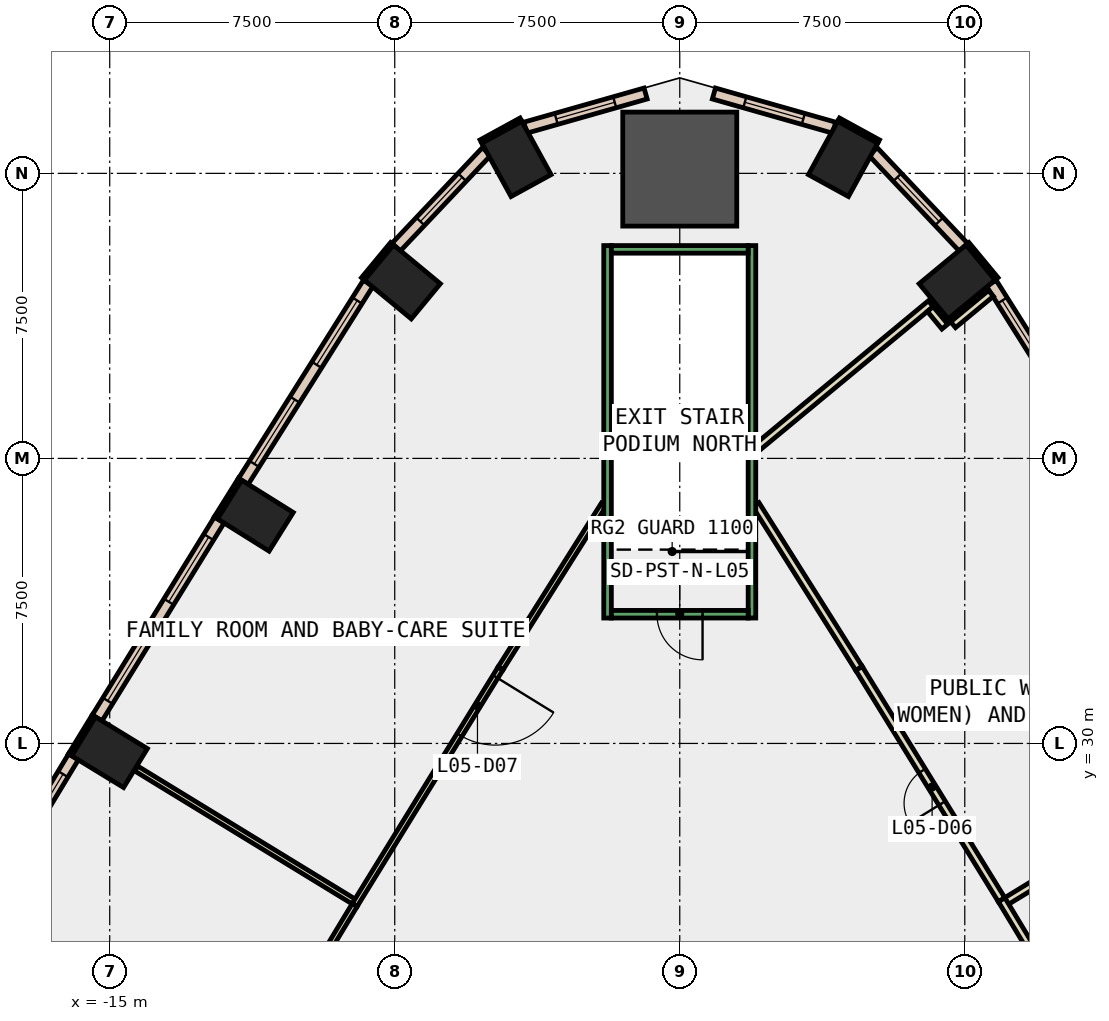
"""IFC4 building model, lengths in metres.
Left out: names, types, materials, properties, quantities, classifications, styles, units other than length and angle.
Written with IfcOpenShell. Run it as: python <this file> out.ifc"""

import sys

from ifc_helpers import new_model, si_unit, direction, frame, frame_2d, origin, origin_2d, place, context, subcontext, project, spatial, rectangle, extrude, element, fill, save


model = new_model("IFC4")
c1 = context("Model", 3, precision=1e-05, world=origin(), true_north=direction((0.0, 1.0)))
c2 = subcontext(c1, "Body", "Model", "MODEL_VIEW")
j1 = project(units=[si_unit("LENGTHUNIT", "METRE"), si_unit("PLANEANGLEUNIT", "RADIAN")], contexts=[c1])
p1 = place(None, origin())
s1 = spatial("IfcSite", under=j1, at=p1, CompositionType="ELEMENT")
p2 = place(p1, origin())
s2 = spatial("IfcBuilding", under=s1, at=p2, CompositionType="ELEMENT")
p3 = place(p2, frame((0.0, 0.0, 30.0)))
s3 = spatial("IfcBuildingStorey", under=s2, at=p3, CompositionType="ELEMENT", Elevation=30.0)
for number, where, z_axis, x_axis in (
    (1, (7.299, 42.144, -0.45), (0.0, 0.0, 1.0), (-0.638, 0.77, 0.0)),
    (2, (4.297, 45.38, -0.45), (0.0, 0.0, 1.0), (-0.877, 0.48, 0.0)),
):
    element("IfcColumn", number, at=place(p3, frame(where, z_axis=z_axis, x_axis=x_axis)), inside=s3, PredefinedType="COLUMN", context=c2, shape_type="SweptSolid", body=[
        extrude(rectangle(XDim=1.2, YDim=1.6, at=origin_2d()), origin(), (0.0, 0.0, 1.0), 4.85),
    ])
p4 = place(p3, frame((0.0, 45.112, -0.45), z_axis=(0.0, 0.0, 1.0), x_axis=(0.0, 1.0, 0.0)))
e3 = element("IfcColumn", 3, at=p4, inside=s3, PredefinedType="COLUMN", context=c2, shape_type="SweptSolid", body=[
    extrude(rectangle(XDim=3.0, YDim=3.0, at=origin_2d()), origin(), (0.0, 0.0, 1.0), 4.85),
])
for number, where, z_axis, x_axis in (
    (4, (-4.297, 45.38, -0.45), (0.0, 0.0, 1.0), (0.877, 0.48, 0.0)),
    (5, (-7.299, 42.144, -0.45), (0.0, 0.0, 1.0), (0.638, 0.77, 0.0)),
    (6, (-11.167, 35.993, -0.45), (0.0, 0.0, 1.0), (0.53, 0.848, 0.0)),
    (7, (-15.005, 29.769, -0.45), (0.0, 0.0, 1.0), (0.522, 0.853, 0.0)),
):
    element("IfcColumn", number, at=place(p3, frame(where, z_axis=z_axis, x_axis=x_axis)), inside=s3, PredefinedType="COLUMN", context=c2, shape_type="SweptSolid", body=[
        extrude(rectangle(XDim=1.2, YDim=1.6, at=origin_2d()), origin(), (0.0, 0.0, 1.0), 4.85),
    ])
for number, where, z_axis, x_axis in (
    (8, (5.231, 45.837, 0.0), (0.0, 0.0, 1.0), (-0.877, 0.48, 0.0)),
    (9, (-4.179, 46.413, 0.0), (0.0, 0.0, 1.0), (-0.877, -0.48, 0.0)),
    (10, (8.336, 42.224, 0.0), (0.0, 0.0, 1.0), (-0.638, 0.77, 0.0)),
    (11, (-7.571, 43.148, 0.0), (0.0, 0.0, 1.0), (-0.638, -0.77, 0.0)),
    (12, (-11.57, 36.952, 0.0), (0.0, 0.0, 1.0), (-0.53, -0.848, 0.0)),
):
    element("IfcWall", number, at=place(p3, frame(where, z_axis=z_axis, x_axis=x_axis)), inside=s3, PredefinedType="STANDARD", context=c2, shape_type="SweptSolid", body=[
        extrude(rectangle(XDim=1.199, YDim=0.1, at=frame_2d((0.6, 0.0))), origin(), (0.0, 0.0, 1.0), 4.4),
    ])
p5 = place(p3, frame((-15.417, 30.724, 0.0), z_axis=(0.0, 0.0, 1.0), x_axis=(-0.521507599072, -0.853246637327, 0.0)))
e13 = element("IfcWall", 13, at=p5, inside=s3, PredefinedType="STANDARD", context=c2, shape_type="SweptSolid", body=[
    extrude(rectangle(XDim=1.2, YDim=0.1, at=frame_2d((0.6, 0.0))), origin(), (0.0, 0.0, 1.0), 4.4),
])
p6 = place(p3, frame((11.483, 36.897, 0.0), z_axis=(0.0, 0.0, 1.0), x_axis=(-0.53304020879, 0.846089910006, 0.0)))
e14 = element("IfcWall", 14, at=p6, inside=s3, PredefinedType="STANDARD", context=c2, shape_type="SweptSolid", body=[
    extrude(rectangle(XDim=6.163, YDim=0.3, at=frame_2d((3.081, 0.0))), origin(), (0.0, 0.0, 1.0), 4.4),
])
p7 = place(p6, frame((0.541, 0.0, 1.0)))
e15 = element("IfcOpeningElement", 15, at=p7, cuts=e14, PredefinedType="OPENING", context=c2, shape_type="SweptSolid", body=[
    extrude(rectangle(XDim=2.0, YDim=3.2, at=frame_2d((1.0, 1.6))), frame((0.0, 0.16, 0.0), z_axis=(0.0, -1.0, 0.0), x_axis=(1.0, 0.0, 0.0)), (0.0, 0.0, 1.0), 0.32),
])
p8 = place(p6, frame((3.622, 0.0, 1.0)))
e16 = element("IfcOpeningElement", 16, at=p8, cuts=e14, PredefinedType="OPENING", context=c2, shape_type="SweptSolid", body=[
    extrude(rectangle(XDim=2.0, YDim=3.2, at=frame_2d((1.0, 1.6))), frame((0.0, 0.16, 0.0), z_axis=(0.0, -1.0, 0.0), x_axis=(1.0, 0.0, 0.0)), (0.0, 0.0, 1.0), 0.32),
])
p9 = place(p3, frame((7.464, 43.058, 0.0), z_axis=(0.0, 0.0, 1.0), x_axis=(-0.687081126245, 0.726580708495, 0.0)))
e17 = element("IfcWall", 17, at=p9, inside=s3, PredefinedType="STANDARD", context=c2, shape_type="SweptSolid", body=[
    extrude(rectangle(XDim=3.461, YDim=0.3, at=frame_2d((1.73, 0.0))), origin(), (0.0, 0.0, 1.0), 4.4),
])
p10 = place(p9, frame((0.931, 0.0, 1.0)))
e18 = element("IfcOpeningElement", 18, at=p10, cuts=e17, PredefinedType="OPENING", context=c2, shape_type="SweptSolid", body=[
    extrude(rectangle(XDim=1.6, YDim=3.2, at=frame_2d((0.8, 1.6))), frame((0.0, 0.16, 0.0), z_axis=(0.0, -1.0, 0.0), x_axis=(1.0, 0.0, 0.0)), (0.0, 0.0, 1.0), 0.32),
])
p11 = place(p3, frame((4.064, 46.202, 0.0), z_axis=(0.0, 0.0, 1.0), x_axis=(-0.961934470867, 0.273280211062, 0.0)))
e19 = element("IfcWall", 19, at=p11, inside=s3, PredefinedType="STANDARD", context=c2, shape_type="SweptSolid", body=[
    extrude(rectangle(XDim=3.29, YDim=0.3, at=frame_2d((1.645, 0.0))), origin(), (0.0, 0.0, 1.0), 4.4),
])
p12 = place(p11, frame((0.845, 0.0, 1.0)))
e20 = element("IfcOpeningElement", 20, at=p12, cuts=e19, PredefinedType="OPENING", context=c2, shape_type="SweptSolid", body=[
    extrude(rectangle(XDim=1.6, YDim=3.2, at=frame_2d((0.8, 1.6))), frame((0.0, 0.16, 0.0), z_axis=(0.0, -1.0, 0.0), x_axis=(1.0, 0.0, 0.0)), (0.0, 0.0, 1.0), 0.32),
])
p13 = place(p3, frame((-0.899, 47.101, 0.0), z_axis=(0.0, 0.0, 1.0), x_axis=(-0.961934470867, -0.273280211062, 0.0)))
e21 = element("IfcWall", 21, at=p13, inside=s3, PredefinedType="STANDARD", context=c2, shape_type="SweptSolid", body=[
    extrude(rectangle(XDim=3.29, YDim=0.3, at=frame_2d((1.645, 0.0))), origin(), (0.0, 0.0, 1.0), 4.4),
])
p14 = place(p13, frame((0.845, 0.0, 1.0)))
e22 = element("IfcOpeningElement", 22, at=p14, cuts=e21, PredefinedType="OPENING", context=c2, shape_type="SweptSolid", body=[
    extrude(rectangle(XDim=1.6, YDim=3.2, at=frame_2d((0.8, 1.6))), frame((0.0, 0.16, 0.0), z_axis=(0.0, -1.0, 0.0), x_axis=(1.0, 0.0, 0.0)), (0.0, 0.0, 1.0), 0.32),
])
p15 = place(p3, frame((-5.086, 45.573, 0.0), z_axis=(0.0, 0.0, 1.0), x_axis=(-0.687081126245, -0.726580708495, 0.0)))
e23 = element("IfcWall", 23, at=p15, inside=s3, PredefinedType="STANDARD", context=c2, shape_type="SweptSolid", body=[
    extrude(rectangle(XDim=3.461, YDim=0.3, at=frame_2d((1.73, 0.0))), origin(), (0.0, 0.0, 1.0), 4.4),
])
p16 = place(p15, frame((0.931, 0.0, 1.0)))
e24 = element("IfcOpeningElement", 24, at=p16, cuts=e23, PredefinedType="OPENING", context=c2, shape_type="SweptSolid", body=[
    extrude(rectangle(XDim=1.6, YDim=3.2, at=frame_2d((0.8, 1.6))), frame((0.0, 0.16, 0.0), z_axis=(0.0, -1.0, 0.0), x_axis=(1.0, 0.0, 0.0)), (0.0, 0.0, 1.0), 0.32),
])
p17 = place(p3, frame((-8.198, 42.111, 0.0), z_axis=(0.0, 0.0, 1.0), x_axis=(-0.53304020879, -0.846089910006, 0.0)))
e25 = element("IfcWall", 25, at=p17, inside=s3, PredefinedType="STANDARD", context=c2, shape_type="SweptSolid", body=[
    extrude(rectangle(XDim=6.163, YDim=0.3, at=frame_2d((3.081, 0.0))), origin(), (0.0, 0.0, 1.0), 4.4),
])
p18 = place(p17, frame((0.541, 0.0, 1.0)))
e26 = element("IfcOpeningElement", 26, at=p18, cuts=e25, PredefinedType="OPENING", context=c2, shape_type="SweptSolid", body=[
    extrude(rectangle(XDim=2.0, YDim=3.2, at=frame_2d((1.0, 1.6))), frame((0.0, 0.16, 0.0), z_axis=(0.0, -1.0, 0.0), x_axis=(1.0, 0.0, 0.0)), (0.0, 0.0, 1.0), 0.32),
])
p19 = place(p17, frame((3.622, 0.0, 1.0)))
e27 = element("IfcOpeningElement", 27, at=p19, cuts=e25, PredefinedType="OPENING", context=c2, shape_type="SweptSolid", body=[
    extrude(rectangle(XDim=2.0, YDim=3.2, at=frame_2d((1.0, 1.6))), frame((0.0, 0.16, 0.0), z_axis=(0.0, -1.0, 0.0), x_axis=(1.0, 0.0, 0.0)), (0.0, 0.0, 1.0), 0.32),
])
p20 = place(p3, frame((-12.117, 35.881, 0.0), z_axis=(0.0, 0.0, 1.0), x_axis=(-0.524953701886, -0.85113078365, 0.0)))
e28 = element("IfcWall", 28, at=p20, inside=s3, PredefinedType="STANDARD", context=c2, shape_type="SweptSolid", body=[
    extrude(rectangle(XDim=6.123, YDim=0.3, at=frame_2d((3.061, 0.0))), origin(), (0.0, 0.0, 1.0), 4.4),
])
p21 = place(p20, frame((0.531, 0.0, 1.0)))
e29 = element("IfcOpeningElement", 29, at=p21, cuts=e28, PredefinedType="OPENING", context=c2, shape_type="SweptSolid", body=[
    extrude(rectangle(XDim=2.0, YDim=3.2, at=frame_2d((1.0, 1.6))), frame((0.0, 0.16, 0.0), z_axis=(0.0, -1.0, 0.0), x_axis=(1.0, 0.0, 0.0)), (0.0, 0.0, 1.0), 0.32),
])
p22 = place(p20, frame((3.592, 0.0, 1.0)))
e30 = element("IfcOpeningElement", 30, at=p22, cuts=e28, PredefinedType="OPENING", context=c2, shape_type="SweptSolid", body=[
    extrude(rectangle(XDim=2.0, YDim=3.2, at=frame_2d((1.0, 1.6))), frame((0.0, 0.16, 0.0), z_axis=(0.0, -1.0, 0.0), x_axis=(1.0, 0.0, 0.0)), (0.0, 0.0, 1.0), 0.32),
])
p23 = place(p3, frame((-15.954, 29.647, 0.0), z_axis=(0.0, 0.0, 1.0), x_axis=(-0.516687651362, -0.85617397235, 0.0)))
e31 = element("IfcWall", 31, at=p23, inside=s3, PredefinedType="STANDARD", context=c2, shape_type="SweptSolid", body=[
    extrude(rectangle(XDim=6.121, YDim=0.3, at=frame_2d((3.061, 0.0))), origin(), (0.0, 0.0, 1.0), 4.4),
])
p24 = place(p23, frame((0.53, 0.0, 1.0)))
e32 = element("IfcOpeningElement", 32, at=p24, cuts=e31, PredefinedType="OPENING", context=c2, shape_type="SweptSolid", body=[
    extrude(rectangle(XDim=2.0, YDim=3.2, at=frame_2d((1.0, 1.6))), frame((0.0, 0.16, 0.0), z_axis=(0.0, -1.0, 0.0), x_axis=(1.0, 0.0, 0.0)), (0.0, 0.0, 1.0), 0.32),
])
p25 = place(p23, frame((3.591, 0.0, 1.0)))
e33 = element("IfcOpeningElement", 33, at=p25, cuts=e31, PredefinedType="OPENING", context=c2, shape_type="SweptSolid", body=[
    extrude(rectangle(XDim=2.0, YDim=3.2, at=frame_2d((1.0, 1.6))), frame((0.0, 0.16, 0.0), z_axis=(0.0, -1.0, 0.0), x_axis=(1.0, 0.0, 0.0)), (0.0, 0.0, 1.0), 0.32),
])
p26 = place(p3, frame((8.52, 25.804, 0.0), z_axis=(0.0, 0.0, 1.0), x_axis=(0.853194970622, 0.521592122358, 0.0)))
e34 = element("IfcWall", 34, at=p26, inside=s3, PredefinedType="PARTITIONING", context=c2, shape_type="SweptSolid", body=[
    extrude(rectangle(XDim=6.601, YDim=0.2, at=frame_2d((3.301, 0.0))), origin(), (0.0, 0.0, 1.0), 4.4),
])
p27 = place(p3, frame((12.256, 19.614, 0.0), z_axis=(0.0, 0.0, 1.0), x_axis=(-0.516756729015, 0.856132281261, 0.0)))
e35 = element("IfcWall", 35, at=p27, inside=s3, PredefinedType="PARTITIONING", context=c2, shape_type="SweptSolid", body=[
    extrude(rectangle(XDim=7.331, YDim=0.2, at=frame_2d((3.665, 0.0))), origin(), (0.0, 0.0, 1.0), 4.4),
])
p28 = place(p27, frame((0.1, 0.0, 0.0)))
e36 = element("IfcOpeningElement", 36, at=p28, cuts=e35, PredefinedType="OPENING", context=c2, shape_type="SweptSolid", body=[
    extrude(rectangle(XDim=1.0, YDim=2.1, at=frame_2d((0.5, 1.05))), frame((0.0, 0.11, 0.0), z_axis=(0.0, -1.0, 0.0), x_axis=(1.0, 0.0, 0.0)), (0.0, 0.0, 1.0), 0.22),
])
p29 = place(p3, frame((2.0, 37.758, 0.0), z_axis=(0.0, 0.0, 1.0), x_axis=(0.7702988792, 0.637683022122, 0.0)))
e37 = element("IfcWall", 37, at=p29, inside=s3, PredefinedType="PARTITIONING", context=c2, shape_type="SweptSolid", body=[
    extrude(rectangle(XDim=5.979, YDim=0.2, at=frame_2d((2.99, 0.0))), origin(), (0.0, 0.0, 1.0), 4.4),
])
p30 = place(p3, frame((6.593, 41.43, 0.0), z_axis=(0.0, 0.0, 1.0), x_axis=(0.636576557089, -0.771213515808, 0.0)))
e38 = element("IfcWall", 38, at=p30, inside=s3, PredefinedType="PARTITIONING", context=c2, shape_type="SweptSolid", body=[
    extrude(rectangle(XDim=0.6, YDim=0.2, at=frame_2d((0.3, 0.0))), origin(), (0.0, 0.0, 1.0), 4.4),
])
p31 = place(p3, frame((7.193, 41.018, 0.0), z_axis=(0.0, 0.0, 1.0), x_axis=(0.77046149962, 0.637486531311, 0.0)))
e39 = element("IfcWall", 39, at=p31, inside=s3, PredefinedType="PARTITIONING", context=c2, shape_type="SweptSolid", body=[
    extrude(rectangle(XDim=1.292, YDim=0.2, at=frame_2d((0.646, 0.0))), origin(), (0.0, 0.0, 1.0), 4.4),
])
p32 = place(p3, frame((4.717, 31.973, 0.0), z_axis=(0.0, 0.0, 1.0), x_axis=(-0.533277069601, 0.845940640375, 0.0)))
e40 = element("IfcWall", 40, at=p32, inside=s3, PredefinedType="PARTITIONING", context=c2, shape_type="SweptSolid", body=[
    extrude(rectangle(XDim=5.095, YDim=0.2, at=frame_2d((2.547, 0.0))), origin(), (0.0, 0.0, 1.0), 4.4),
])
p33 = place(p3, frame((8.467, 25.89, 0.0), z_axis=(0.0, 0.0, 1.0), x_axis=(-0.524768238136, 0.851245144623, 0.0)))
e41 = element("IfcWall", 41, at=p33, inside=s3, PredefinedType="PARTITIONING", context=c2, shape_type="SweptSolid", body=[
    extrude(rectangle(XDim=7.146, YDim=0.2, at=frame_2d((3.573, 0.0))), origin(), (0.0, 0.0, 1.0), 4.4),
])
p34 = place(p33, frame((2.981, 0.0, 0.0)))
e42 = element("IfcOpeningElement", 42, at=p34, cuts=e41, PredefinedType="OPENING", context=c2, shape_type="SweptSolid", body=[
    extrude(rectangle(XDim=1.0, YDim=2.1, at=frame_2d((0.5, 1.05))), frame((0.0, 0.11, 0.0), z_axis=(0.0, -1.0, 0.0), x_axis=(1.0, 0.0, 0.0)), (0.0, 0.0, 1.0), 0.22),
])
p35 = place(p3, frame((-8.52, 25.804, 0.0), z_axis=(0.0, 0.0, 1.0), x_axis=(-0.85315809523, 0.521652436535, 0.0)))
e43 = element("IfcWall", 43, at=p35, inside=s3, PredefinedType="PARTITIONING", context=c2, shape_type="SweptSolid", body=[
    extrude(rectangle(XDim=6.781, YDim=0.15, at=frame_2d((3.39, 0.0))), origin(), (0.0, 0.0, 1.0), 4.4),
])
p36 = place(p3, frame((-2.0, 36.283, 0.0), z_axis=(0.0, 0.0, 1.0), x_axis=(-0.533277069601, -0.845940640375, 0.0)))
e44 = element("IfcWall", 44, at=p36, inside=s3, PredefinedType="PARTITIONING", context=c2, shape_type="SweptSolid", body=[
    extrude(rectangle(XDim=5.095, YDim=0.15, at=frame_2d((2.547, 0.0))), origin(), (0.0, 0.0, 1.0), 4.4),
])
p37 = place(p3, frame((-4.717, 31.973, 0.0), z_axis=(0.0, 0.0, 1.0), x_axis=(-0.524752860455, -0.85125462433, 0.0)))
e45 = element("IfcWall", 45, at=p37, inside=s3, PredefinedType="PARTITIONING", context=c2, shape_type="SweptSolid", body=[
    extrude(rectangle(XDim=7.314, YDim=0.15, at=frame_2d((3.657, 0.0))), origin(), (0.0, 0.0, 1.0), 4.4),
])
p38 = place(p37, frame((0.255, 0.0, 0.0)))
e46 = element("IfcOpeningElement", 46, at=p38, cuts=e45, PredefinedType="OPENING", context=c2, shape_type="SweptSolid", body=[
    extrude(rectangle(XDim=1.8, YDim=2.1, at=frame_2d((0.9, 1.05))), frame((0.0, 0.085, 0.0), z_axis=(0.0, -1.0, 0.0), x_axis=(1.0, 0.0, 0.0)), (0.0, 0.0, 1.0), 0.17),
])
p39 = place(p3, frame((-8.554, 25.747, 0.0), z_axis=(0.0, 0.0, 1.0), x_axis=(-0.516784275168, -0.85611565395, 0.0)))
e47 = element("IfcWall", 47, at=p39, inside=s3, PredefinedType="PARTITIONING", context=c2, shape_type="SweptSolid", body=[
    extrude(rectangle(XDim=7.164, YDim=0.15, at=frame_2d((3.582, 0.0))), origin(), (0.0, 0.0, 1.0), 4.4),
])
for number, where, z_axis, x_axis in (
    (48, (1.9, 33.3, 0.0), (0.0, 0.0, 1.0), (0.0, 1.0, 0.0)),
    (49, (-1.9, 33.3, 0.0), (0.0, 0.0, 1.0), (0.0, 1.0, 0.0)),
):
    element("IfcWall", number, at=place(p3, frame(where, z_axis=z_axis, x_axis=x_axis)), inside=s3, PredefinedType="STANDARD", context=c2, shape_type="SweptSolid", body=[
        extrude(rectangle(XDim=9.8, YDim=0.2, at=frame_2d((4.9, 0.0))), origin(), (0.0, 0.0, 1.0), 3.2),
    ])
p40 = place(p3, frame((1.8, 33.4, 0.0), z_axis=(0.0, 0.0, 1.0), x_axis=(-1.0, 0.0, 0.0)))
e50 = element("IfcWall", 50, at=p40, inside=s3, PredefinedType="STANDARD", context=c2, shape_type="SweptSolid", body=[
    extrude(rectangle(XDim=3.6, YDim=0.2, at=frame_2d((1.8, 0.0))), origin(), (0.0, 0.0, 1.0), 3.2),
])
p41 = place(p40, frame((1.2, 0.0, 0.0)))
e51 = element("IfcOpeningElement", 51, at=p41, cuts=e50, PredefinedType="OPENING", context=c2, shape_type="SweptSolid", body=[
    extrude(rectangle(XDim=1.2, YDim=2.2, at=frame_2d((0.6, 1.1))), frame((0.0, 0.11, 0.0), z_axis=(0.0, -1.0, 0.0), x_axis=(1.0, 0.0, 0.0)), (0.0, 0.0, 1.0), 0.22),
])
p42 = place(p3, frame((1.8, 43.0, 0.0), z_axis=(0.0, 0.0, 1.0), x_axis=(-1.0, 0.0, 0.0)))
e52 = element("IfcWall", 52, at=p42, inside=s3, PredefinedType="STANDARD", context=c2, shape_type="SweptSolid", body=[
    extrude(rectangle(XDim=3.6, YDim=0.2, at=frame_2d((1.8, 0.0))), origin(), (0.0, 0.0, 1.0), 3.2),
])
p43 = place(p8, origin())
e53 = element("IfcWindow", 53, at=p43, inside=s3, PartitioningType="SINGLE_PANEL", PredefinedType="WINDOW", context=c2, shape_type="SweptSolid", body=[
    extrude(rectangle(XDim=2.0, YDim=3.2, at=frame_2d((1.0, 1.6))), frame((0.0, 0.03, 0.0), z_axis=(0.0, -1.0, 0.0), x_axis=(1.0, 0.0, 0.0)), (0.0, 0.0, 1.0), 0.06),
])
fill(e16, e53)
p44 = place(p10, origin())
e54 = element("IfcWindow", 54, at=p44, inside=s3, PartitioningType="SINGLE_PANEL", PredefinedType="WINDOW", context=c2, shape_type="SweptSolid", body=[
    extrude(rectangle(XDim=1.6, YDim=3.2, at=frame_2d((0.8, 1.6))), frame((0.0, 0.03, 0.0), z_axis=(0.0, -1.0, 0.0), x_axis=(1.0, 0.0, 0.0)), (0.0, 0.0, 1.0), 0.06),
])
fill(e18, e54)
p45 = place(p12, origin())
e55 = element("IfcWindow", 55, at=p45, inside=s3, PartitioningType="SINGLE_PANEL", PredefinedType="WINDOW", context=c2, shape_type="SweptSolid", body=[
    extrude(rectangle(XDim=1.6, YDim=3.2, at=frame_2d((0.8, 1.6))), frame((0.0, 0.03, 0.0), z_axis=(0.0, -1.0, 0.0), x_axis=(1.0, 0.0, 0.0)), (0.0, 0.0, 1.0), 0.06),
])
fill(e20, e55)
p46 = place(p14, origin())
e56 = element("IfcWindow", 56, at=p46, inside=s3, PartitioningType="SINGLE_PANEL", PredefinedType="WINDOW", context=c2, shape_type="SweptSolid", body=[
    extrude(rectangle(XDim=1.6, YDim=3.2, at=frame_2d((0.8, 1.6))), frame((0.0, 0.03, 0.0), z_axis=(0.0, -1.0, 0.0), x_axis=(1.0, 0.0, 0.0)), (0.0, 0.0, 1.0), 0.06),
])
fill(e22, e56)
p47 = place(p16, origin())
e57 = element("IfcWindow", 57, at=p47, inside=s3, PartitioningType="SINGLE_PANEL", PredefinedType="WINDOW", context=c2, shape_type="SweptSolid", body=[
    extrude(rectangle(XDim=1.6, YDim=3.2, at=frame_2d((0.8, 1.6))), frame((0.0, 0.03, 0.0), z_axis=(0.0, -1.0, 0.0), x_axis=(1.0, 0.0, 0.0)), (0.0, 0.0, 1.0), 0.06),
])
fill(e24, e57)
p48 = place(p18, origin())
e58 = element("IfcWindow", 58, at=p48, inside=s3, PartitioningType="SINGLE_PANEL", PredefinedType="WINDOW", context=c2, shape_type="SweptSolid", body=[
    extrude(rectangle(XDim=2.0, YDim=3.2, at=frame_2d((1.0, 1.6))), frame((0.0, 0.03, 0.0), z_axis=(0.0, -1.0, 0.0), x_axis=(1.0, 0.0, 0.0)), (0.0, 0.0, 1.0), 0.06),
])
fill(e26, e58)
p49 = place(p19, origin())
e59 = element("IfcWindow", 59, at=p49, inside=s3, PartitioningType="SINGLE_PANEL", PredefinedType="WINDOW", context=c2, shape_type="SweptSolid", body=[
    extrude(rectangle(XDim=2.0, YDim=3.2, at=frame_2d((1.0, 1.6))), frame((0.0, 0.03, 0.0), z_axis=(0.0, -1.0, 0.0), x_axis=(1.0, 0.0, 0.0)), (0.0, 0.0, 1.0), 0.06),
])
fill(e27, e59)
p50 = place(p21, origin())
e60 = element("IfcWindow", 60, at=p50, inside=s3, PartitioningType="SINGLE_PANEL", PredefinedType="WINDOW", context=c2, shape_type="SweptSolid", body=[
    extrude(rectangle(XDim=2.0, YDim=3.2, at=frame_2d((1.0, 1.6))), frame((0.0, 0.03, 0.0), z_axis=(0.0, -1.0, 0.0), x_axis=(1.0, 0.0, 0.0)), (0.0, 0.0, 1.0), 0.06),
])
fill(e29, e60)
p51 = place(p22, origin())
e61 = element("IfcWindow", 61, at=p51, inside=s3, PartitioningType="SINGLE_PANEL", PredefinedType="WINDOW", context=c2, shape_type="SweptSolid", body=[
    extrude(rectangle(XDim=2.0, YDim=3.2, at=frame_2d((1.0, 1.6))), frame((0.0, 0.03, 0.0), z_axis=(0.0, -1.0, 0.0), x_axis=(1.0, 0.0, 0.0)), (0.0, 0.0, 1.0), 0.06),
])
fill(e30, e61)
p52 = place(p24, origin())
e62 = element("IfcWindow", 62, at=p52, inside=s3, PartitioningType="SINGLE_PANEL", PredefinedType="WINDOW", context=c2, shape_type="SweptSolid", body=[
    extrude(rectangle(XDim=2.0, YDim=3.2, at=frame_2d((1.0, 1.6))), frame((0.0, 0.03, 0.0), z_axis=(0.0, -1.0, 0.0), x_axis=(1.0, 0.0, 0.0)), (0.0, 0.0, 1.0), 0.06),
])
fill(e32, e62)
p53 = place(p34, origin())
e63 = element("IfcDoor", 63, at=p53, inside=s3, OperationType="SINGLE_SWING_LEFT", PredefinedType="DOOR", context=c2, shape_type="SweptSolid", body=[
    extrude(rectangle(XDim=1.0, YDim=2.1, at=frame_2d((0.5, 1.05))), frame((0.0, 0.025, 0.0), z_axis=(0.0, -1.0, 0.0), x_axis=(1.0, 0.0, 0.0)), (0.0, 0.0, 1.0), 0.05),
])
fill(e42, e63)
p54 = place(p38, origin())
e64 = element("IfcDoor", 64, at=p54, inside=s3, OperationType="DOUBLE_DOOR_SINGLE_SWING", PredefinedType="DOOR", context=c2, shape_type="SweptSolid", body=[
    extrude(rectangle(XDim=1.8, YDim=2.1, at=frame_2d((0.9, 1.05))), frame((0.0, 0.025, 0.0), z_axis=(0.0, -1.0, 0.0), x_axis=(1.0, 0.0, 0.0)), (0.0, 0.0, 1.0), 0.05),
])
fill(e46, e64)
p55 = place(p41, origin())
e65 = element("IfcDoor", 65, at=p55, inside=s3, OperationType="SINGLE_SWING_LEFT", PredefinedType="DOOR", context=c2, shape_type="SweptSolid", body=[
    extrude(rectangle(XDim=1.2, YDim=2.2, at=frame_2d((0.6, 1.1))), frame((0.0, 0.025, 0.0), z_axis=(0.0, -1.0, 0.0), x_axis=(1.0, 0.0, 0.0)), (0.0, 0.0, 1.0), 0.05),
])
fill(e51, e65)
save(model, sys.argv[1])
